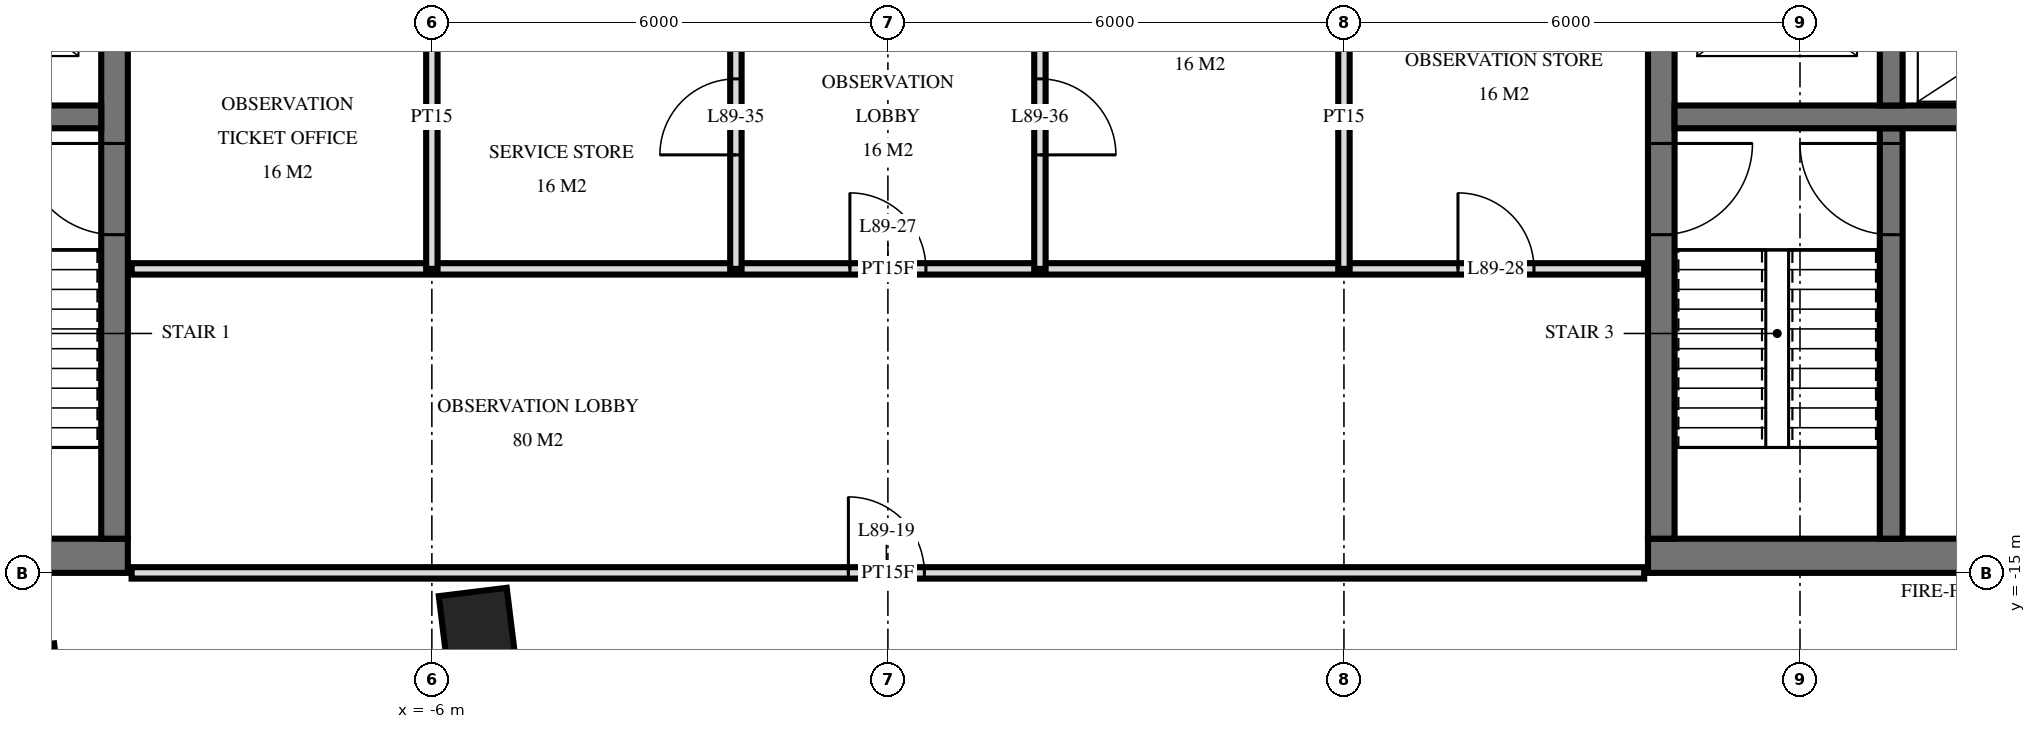
"""IFC4 building model, lengths in metres.
Left out: names, types, materials, properties, quantities, classifications, styles, units other than length and angle.
Written with IfcOpenShell. Run it as: python <this file> out.ifc"""

import sys

from ifc_helpers import new_model, si_unit, direction, frame, frame_2d, origin, origin_2d, place, context, subcontext, project, spatial, rectangle, extrude, element, fill, save


model = new_model("IFC4")
c1 = context("Model", 3, precision=1e-05, world=origin(), true_north=direction((0.0, 1.0)))
c2 = subcontext(c1, "Body", "Model", "MODEL_VIEW")
j1 = project(units=[si_unit("LENGTHUNIT", "METRE"), si_unit("PLANEANGLEUNIT", "RADIAN")], contexts=[c1])
p1 = place(None, origin())
s1 = spatial("IfcSite", under=j1, at=p1, CompositionType="ELEMENT")
p2 = place(p1, origin())
s2 = spatial("IfcBuilding", under=s1, at=p2, CompositionType="ELEMENT")
p3 = place(p2, frame((0.0, 0.0, 338.6)))
s3 = spatial("IfcBuildingStorey", under=s2, at=p3, CompositionType="ELEMENT", Elevation=338.6)
for number, where, z_axis, x_axis in (
    (1, (-11.362, -16.429, 0.0), (0.0, 0.0, 1.0), (0.993, 0.122, 0.0)),
    (2, (-5.407, -15.698, 0.0), (0.0, 0.0, 1.0), (0.993, 0.122, 0.0)),
):
    element("IfcColumn", number, at=place(p3, frame(where, z_axis=z_axis, x_axis=x_axis)), inside=s3, PredefinedType="COLUMN", context=c2, shape_type="SweptSolid", body=[
        extrude(rectangle(XDim=0.9, YDim=0.9, at=origin_2d()), origin(), (0.0, 0.0, 1.0), 4.0),
    ])
p4 = place(p3, frame((-19.5, -14.775, 0.0), z_axis=(0.0, 0.0, 1.0), x_axis=(1.0, 0.0, 0.0)))
e3 = element("IfcWall", 3, at=p4, inside=s3, PredefinedType="SHEAR", context=c2, shape_type="SweptSolid", body=[
    extrude(rectangle(XDim=9.5, YDim=0.45, at=frame_2d((4.75, 0.0))), origin(), (0.0, 0.0, 1.0), 4.0),
])
p5 = place(p4, frame((1.2, 0.0, 0.0)))
e4 = element("IfcOpeningElement", 4, at=p5, cuts=e3, PredefinedType="OPENING", context=c2, shape_type="SweptSolid", body=[
    extrude(rectangle(XDim=1.2, YDim=2.1, at=frame_2d((0.6, 1.05))), frame((0.0, 0.235, 0.0), z_axis=(0.0, -1.0, 0.0), x_axis=(1.0, 0.0, 0.0)), (0.0, 0.0, 1.0), 0.47),
])
p6 = place(p4, frame((4.25, 0.0, 0.0)))
e5 = element("IfcOpeningElement", 5, at=p6, cuts=e3, PredefinedType="OPENING", context=c2, shape_type="SweptSolid", body=[
    extrude(rectangle(XDim=1.1, YDim=2.1, at=frame_2d((0.55, 1.05))), frame((0.0, 0.235, 0.0), z_axis=(0.0, -1.0, 0.0), x_axis=(1.0, 0.0, 0.0)), (0.0, 0.0, 1.0), 0.47),
])
p7 = place(p3, frame((-10.175, -14.55, 0.0), z_axis=(0.0, 0.0, 1.0), x_axis=(0.0, 1.0, 0.0)))
e6 = element("IfcWall", 6, at=p7, inside=s3, PredefinedType="SHEAR", context=c2, shape_type="SweptSolid", body=[
    extrude(rectangle(XDim=14.1, YDim=0.35, at=frame_2d((7.05, 0.0))), origin(), (0.0, 0.0, 1.0), 4.0),
])
p8 = place(p7, frame((8.4, 0.0, 0.0)))
e7 = element("IfcOpeningElement", 7, at=p8, cuts=e6, PredefinedType="OPENING", context=c2, shape_type="SweptSolid", body=[
    extrude(rectangle(XDim=1.4, YDim=2.4, at=frame_2d((0.7, 1.2))), frame((0.0, 0.185, 0.0), z_axis=(0.0, -1.0, 0.0), x_axis=(1.0, 0.0, 0.0)), (0.0, 0.0, 1.0), 0.37),
])
p9 = place(p7, frame((10.0, 0.0, 0.0)))
e8 = element("IfcOpeningElement", 8, at=p9, cuts=e6, PredefinedType="OPENING", context=c2, shape_type="SweptSolid", body=[
    extrude(rectangle(XDim=1.4, YDim=2.4, at=frame_2d((0.7, 1.2))), frame((0.0, 0.185, 0.0), z_axis=(0.0, -1.0, 0.0), x_axis=(1.0, 0.0, 0.0)), (0.0, 0.0, 1.0), 0.37),
])
p10 = place(p7, frame((4.0, 0.0, 0.0)))
e9 = element("IfcOpeningElement", 9, at=p10, cuts=e6, PredefinedType="OPENING", context=c2, shape_type="SweptSolid", body=[
    extrude(rectangle(XDim=1.2, YDim=2.1, at=frame_2d((0.6, 1.05))), frame((0.0, 0.185, 0.0), z_axis=(0.0, -1.0, 0.0), x_axis=(1.0, 0.0, 0.0)), (0.0, 0.0, 1.0), 0.37),
])
p11 = place(p3, frame((-19.05, -9.0, 0.0), z_axis=(0.0, 0.0, 1.0), x_axis=(1.0, 0.0, 0.0)))
e10 = element("IfcWall", 10, at=p11, inside=s3, PredefinedType="SHEAR", context=c2, shape_type="SweptSolid", body=[
    extrude(rectangle(XDim=8.7, YDim=0.3, at=frame_2d((4.35, 0.0))), origin(), (0.0, 0.0, 1.0), 4.0),
])
p12 = place(p11, frame((3.8, 0.0, 0.0)))
e11 = element("IfcOpeningElement", 11, at=p12, cuts=e10, PredefinedType="OPENING", context=c2, shape_type="SweptSolid", body=[
    extrude(rectangle(XDim=1.1, YDim=2.1, at=frame_2d((0.55, 1.05))), frame((0.0, 0.16, 0.0), z_axis=(0.0, -1.0, 0.0), x_axis=(1.0, 0.0, 0.0)), (0.0, 0.0, 1.0), 0.32),
])
p13 = place(p3, frame((10.0, -14.775, 0.0), z_axis=(0.0, 0.0, 1.0), x_axis=(1.0, 0.0, 0.0)))
e12 = element("IfcWall", 12, at=p13, inside=s3, PredefinedType="SHEAR", context=c2, shape_type="SweptSolid", body=[
    extrude(rectangle(XDim=9.5, YDim=0.45, at=frame_2d((4.75, 0.0))), origin(), (0.0, 0.0, 1.0), 4.0),
])
p14 = place(p13, frame((7.1, 0.0, 0.0)))
e13 = element("IfcOpeningElement", 13, at=p14, cuts=e12, PredefinedType="OPENING", context=c2, shape_type="SweptSolid", body=[
    extrude(rectangle(XDim=1.2, YDim=2.1, at=frame_2d((0.6, 1.05))), frame((0.0, 0.235, 0.0), z_axis=(0.0, -1.0, 0.0), x_axis=(1.0, 0.0, 0.0)), (0.0, 0.0, 1.0), 0.47),
])
p15 = place(p13, frame((4.15, 0.0, 0.0)))
e14 = element("IfcOpeningElement", 14, at=p15, cuts=e12, PredefinedType="OPENING", context=c2, shape_type="SweptSolid", body=[
    extrude(rectangle(XDim=1.1, YDim=2.1, at=frame_2d((0.55, 1.05))), frame((0.0, 0.235, 0.0), z_axis=(0.0, -1.0, 0.0), x_axis=(1.0, 0.0, 0.0)), (0.0, 0.0, 1.0), 0.47),
])
p16 = place(p3, frame((10.175, -14.55, 0.0), z_axis=(0.0, 0.0, 1.0), x_axis=(0.0, 1.0, 0.0)))
e15 = element("IfcWall", 15, at=p16, inside=s3, PredefinedType="SHEAR", context=c2, shape_type="SweptSolid", body=[
    extrude(rectangle(XDim=14.1, YDim=0.35, at=frame_2d((7.05, 0.0))), origin(), (0.0, 0.0, 1.0), 4.0),
])
p17 = place(p16, frame((8.4, 0.0, 0.0)))
e16 = element("IfcOpeningElement", 16, at=p17, cuts=e15, PredefinedType="OPENING", context=c2, shape_type="SweptSolid", body=[
    extrude(rectangle(XDim=1.4, YDim=2.4, at=frame_2d((0.7, 1.2))), frame((0.0, 0.185, 0.0), z_axis=(0.0, -1.0, 0.0), x_axis=(1.0, 0.0, 0.0)), (0.0, 0.0, 1.0), 0.37),
])
p18 = place(p16, frame((10.0, 0.0, 0.0)))
e17 = element("IfcOpeningElement", 17, at=p18, cuts=e15, PredefinedType="OPENING", context=c2, shape_type="SweptSolid", body=[
    extrude(rectangle(XDim=1.4, YDim=2.4, at=frame_2d((0.7, 1.2))), frame((0.0, 0.185, 0.0), z_axis=(0.0, -1.0, 0.0), x_axis=(1.0, 0.0, 0.0)), (0.0, 0.0, 1.0), 0.37),
])
p19 = place(p16, frame((4.0, 0.0, 0.0)))
e18 = element("IfcOpeningElement", 18, at=p19, cuts=e15, PredefinedType="OPENING", context=c2, shape_type="SweptSolid", body=[
    extrude(rectangle(XDim=1.2, YDim=2.1, at=frame_2d((0.6, 1.05))), frame((0.0, 0.185, 0.0), z_axis=(0.0, -1.0, 0.0), x_axis=(1.0, 0.0, 0.0)), (0.0, 0.0, 1.0), 0.37),
])
p20 = place(p3, frame((10.35, -9.0, 0.0), z_axis=(0.0, 0.0, 1.0), x_axis=(1.0, 0.0, 0.0)))
e19 = element("IfcWall", 19, at=p20, inside=s3, PredefinedType="SHEAR", context=c2, shape_type="SweptSolid", body=[
    extrude(rectangle(XDim=8.7, YDim=0.3, at=frame_2d((4.35, 0.0))), origin(), (0.0, 0.0, 1.0), 4.0),
])
p21 = place(p20, frame((3.8, 0.0, 0.0)))
e20 = element("IfcOpeningElement", 20, at=p21, cuts=e19, PredefinedType="OPENING", context=c2, shape_type="SweptSolid", body=[
    extrude(rectangle(XDim=1.1, YDim=2.1, at=frame_2d((0.55, 1.05))), frame((0.0, 0.16, 0.0), z_axis=(0.0, -1.0, 0.0), x_axis=(1.0, 0.0, 0.0)), (0.0, 0.0, 1.0), 0.32),
])
p22 = place(p3, frame((13.2, -8.85, 0.0), z_axis=(0.0, 0.0, 1.0), x_axis=(0.0, 1.0, 0.0)))
e21 = element("IfcWall", 21, at=p22, inside=s3, PredefinedType="SHEAR", context=c2, shape_type="SweptSolid", body=[
    extrude(rectangle(XDim=2.3, YDim=0.3, at=frame_2d((1.15, 0.0))), origin(), (0.0, 0.0, 1.0), 4.0),
])
p23 = place(p3, frame((13.2, -14.55, 0.0), z_axis=(0.0, 0.0, 1.0), x_axis=(0.0, 1.0, 0.0)))
e22 = element("IfcWall", 22, at=p23, inside=s3, PredefinedType="SHEAR", context=c2, shape_type="SweptSolid", body=[
    extrude(rectangle(XDim=5.4, YDim=0.3, at=frame_2d((2.7, 0.0))), origin(), (0.0, 0.0, 1.0), 4.0),
])
p24 = place(p23, frame((4.0, 0.0, 0.0)))
e23 = element("IfcOpeningElement", 23, at=p24, cuts=e22, PredefinedType="OPENING", context=c2, shape_type="SweptSolid", body=[
    extrude(rectangle(XDim=1.2, YDim=2.1, at=frame_2d((0.6, 1.05))), frame((0.0, 0.16, 0.0), z_axis=(0.0, -1.0, 0.0), x_axis=(1.0, 0.0, 0.0)), (0.0, 0.0, 1.0), 0.32),
])
p25 = place(p3, frame((6.0, -11.0, 0.0), z_axis=(0.0, 0.0, 1.0), x_axis=(0.0, 1.0, 0.0)))
e24 = element("IfcWall", 24, at=p25, inside=s3, PredefinedType="PARTITIONING", context=c2, shape_type="SweptSolid", body=[
    extrude(rectangle(XDim=4.0, YDim=0.15, at=frame_2d((2.0, 0.0))), origin(), (0.0, 0.0, 1.0), 3.72),
])
p26 = place(p3, frame((2.0, -11.0, 0.0), z_axis=(0.0, 0.0, 1.0), x_axis=(0.0, 1.0, 0.0)))
e25 = element("IfcWall", 25, at=p26, inside=s3, PredefinedType="PARTITIONING", context=c2, shape_type="SweptSolid", body=[
    extrude(rectangle(XDim=4.0, YDim=0.15, at=frame_2d((2.0, 0.0))), origin(), (0.0, 0.0, 1.0), 3.72),
])
p27 = place(p26, frame((1.5, 0.0, 0.0)))
e26 = element("IfcOpeningElement", 26, at=p27, cuts=e25, PredefinedType="OPENING", context=c2, shape_type="SweptSolid", body=[
    extrude(rectangle(XDim=1.0, YDim=2.1, at=frame_2d((0.5, 1.05))), frame((0.0, 0.085, 0.0), z_axis=(0.0, -1.0, 0.0), x_axis=(1.0, 0.0, 0.0)), (0.0, 0.0, 1.0), 0.17),
])
p28 = place(p3, frame((-2.0, -11.0, 0.0), z_axis=(0.0, 0.0, 1.0), x_axis=(0.0, 1.0, 0.0)))
e27 = element("IfcWall", 27, at=p28, inside=s3, PredefinedType="PARTITIONING", context=c2, shape_type="SweptSolid", body=[
    extrude(rectangle(XDim=4.0, YDim=0.15, at=frame_2d((2.0, 0.0))), origin(), (0.0, 0.0, 1.0), 3.72),
])
p29 = place(p28, frame((1.5, 0.0, 0.0)))
e28 = element("IfcOpeningElement", 28, at=p29, cuts=e27, PredefinedType="OPENING", context=c2, shape_type="SweptSolid", body=[
    extrude(rectangle(XDim=1.0, YDim=2.1, at=frame_2d((0.5, 1.05))), frame((0.0, 0.085, 0.0), z_axis=(0.0, -1.0, 0.0), x_axis=(1.0, 0.0, 0.0)), (0.0, 0.0, 1.0), 0.17),
])
p30 = place(p3, frame((-6.0, -11.0, 0.0), z_axis=(0.0, 0.0, 1.0), x_axis=(0.0, 1.0, 0.0)))
e29 = element("IfcWall", 29, at=p30, inside=s3, PredefinedType="PARTITIONING", context=c2, shape_type="SweptSolid", body=[
    extrude(rectangle(XDim=4.0, YDim=0.15, at=frame_2d((2.0, 0.0))), origin(), (0.0, 0.0, 1.0), 3.72),
])
p31 = place(p3, frame((-9.95, -15.0, 0.0), z_axis=(0.0, 0.0, 1.0), x_axis=(1.0, 0.0, 0.0)))
e30 = element("IfcWall", 30, at=p31, inside=s3, PredefinedType="PARTITIONING", context=c2, shape_type="SweptSolid", body=[
    extrude(rectangle(XDim=19.9, YDim=0.15, at=frame_2d((9.95, 0.0))), origin(), (0.0, 0.0, 1.0), 3.084),
])
p32 = place(p31, frame((9.43, 0.0, 0.0)))
e31 = element("IfcOpeningElement", 31, at=p32, cuts=e30, PredefinedType="OPENING", context=c2, shape_type="SweptSolid", body=[
    extrude(rectangle(XDim=1.0, YDim=2.1, at=frame_2d((0.5, 1.05))), frame((0.0, 0.085, 0.0), z_axis=(0.0, -1.0, 0.0), x_axis=(1.0, 0.0, 0.0)), (0.0, 0.0, 1.0), 0.17),
])
p33 = place(p3, frame((-9.95, -11.0, 0.0), z_axis=(0.0, 0.0, 1.0), x_axis=(1.0, 0.0, 0.0)))
e32 = element("IfcWall", 32, at=p33, inside=s3, PredefinedType="PARTITIONING", context=c2, shape_type="SweptSolid", body=[
    extrude(rectangle(XDim=19.9, YDim=0.15, at=frame_2d((9.95, 0.0))), origin(), (0.0, 0.0, 1.0), 3.72),
])
p34 = place(p33, frame((9.45, 0.0, 0.0)))
e33 = element("IfcOpeningElement", 33, at=p34, cuts=e32, PredefinedType="OPENING", context=c2, shape_type="SweptSolid", body=[
    extrude(rectangle(XDim=1.0, YDim=2.1, at=frame_2d((0.5, 1.05))), frame((0.0, 0.085, 0.0), z_axis=(0.0, -1.0, 0.0), x_axis=(1.0, 0.0, 0.0)), (0.0, 0.0, 1.0), 0.17),
])
p35 = place(p33, frame((17.45, 0.0, 0.0)))
e34 = element("IfcOpeningElement", 34, at=p35, cuts=e32, PredefinedType="OPENING", context=c2, shape_type="SweptSolid", body=[
    extrude(rectangle(XDim=1.0, YDim=2.1, at=frame_2d((0.5, 1.05))), frame((0.0, 0.085, 0.0), z_axis=(0.0, -1.0, 0.0), x_axis=(1.0, 0.0, 0.0)), (0.0, 0.0, 1.0), 0.17),
])
p36 = place(p10, origin())
e35 = element("IfcDoor", 35, at=p36, inside=s3, OperationType="SINGLE_SWING_LEFT", PredefinedType="DOOR", context=c2, shape_type="SweptSolid", body=[
    extrude(rectangle(XDim=1.2, YDim=2.1, at=frame_2d((0.6, 1.05))), frame((0.0, 0.025, 0.0), z_axis=(0.0, -1.0, 0.0), x_axis=(1.0, 0.0, 0.0)), (0.0, 0.0, 1.0), 0.05),
])
fill(e9, e35)
p37 = place(p19, frame((0.6, 0.0, 0.0), z_axis=(0.0, 0.0, 1.0), x_axis=(-1.0, 0.0, 0.0)))
e36 = element("IfcDoor", 36, at=p37, inside=s3, OperationType="SINGLE_SWING_RIGHT", PredefinedType="DOOR", context=c2, shape_type="SweptSolid", body=[
    extrude(rectangle(XDim=1.2, YDim=2.1, at=frame_2d((0.0, 1.05))), frame((0.0, -0.025, 0.0), z_axis=(0.0, 1.0, 0.0), x_axis=(-1.0, 0.0, 0.0)), (0.0, 0.0, 1.0), 0.05),
])
fill(e18, e36)
p38 = place(p24, origin())
e37 = element("IfcDoor", 37, at=p38, inside=s3, OperationType="SINGLE_SWING_LEFT", PredefinedType="DOOR", context=c2, shape_type="SweptSolid", body=[
    extrude(rectangle(XDim=1.2, YDim=2.1, at=frame_2d((0.6, 1.05))), frame((0.0, 0.025, 0.0), z_axis=(0.0, -1.0, 0.0), x_axis=(1.0, 0.0, 0.0)), (0.0, 0.0, 1.0), 0.05),
])
fill(e23, e37)
p39 = place(p32, origin())
e38 = element("IfcDoor", 38, at=p39, inside=s3, OperationType="SINGLE_SWING_RIGHT", PredefinedType="DOOR", context=c2, shape_type="SweptSolid", body=[
    extrude(rectangle(XDim=1.0, YDim=2.1, at=frame_2d((0.5, 1.05))), frame((0.0, 0.025, 0.0), z_axis=(0.0, -1.0, 0.0), x_axis=(1.0, 0.0, 0.0)), (0.0, 0.0, 1.0), 0.05),
])
fill(e31, e38)
p40 = place(p34, origin())
e39 = element("IfcDoor", 39, at=p40, inside=s3, OperationType="SINGLE_SWING_RIGHT", PredefinedType="DOOR", context=c2, shape_type="SweptSolid", body=[
    extrude(rectangle(XDim=1.0, YDim=2.1, at=frame_2d((0.5, 1.05))), frame((0.0, 0.025, 0.0), z_axis=(0.0, -1.0, 0.0), x_axis=(1.0, 0.0, 0.0)), (0.0, 0.0, 1.0), 0.05),
])
fill(e33, e39)
p41 = place(p35, origin())
e40 = element("IfcDoor", 40, at=p41, inside=s3, OperationType="SINGLE_SWING_RIGHT", PredefinedType="DOOR", context=c2, shape_type="SweptSolid", body=[
    extrude(rectangle(XDim=1.0, YDim=2.1, at=frame_2d((0.5, 1.05))), frame((0.0, 0.025, 0.0), z_axis=(0.0, -1.0, 0.0), x_axis=(1.0, 0.0, 0.0)), (0.0, 0.0, 1.0), 0.05),
])
fill(e34, e40)
p42 = place(p29, origin())
e41 = element("IfcDoor", 41, at=p42, inside=s3, OperationType="SINGLE_SWING_RIGHT", PredefinedType="DOOR", context=c2, shape_type="SweptSolid", body=[
    extrude(rectangle(XDim=1.0, YDim=2.1, at=frame_2d((0.5, 1.05))), frame((0.0, 0.025, 0.0), z_axis=(0.0, -1.0, 0.0), x_axis=(1.0, 0.0, 0.0)), (0.0, 0.0, 1.0), 0.05),
])
fill(e28, e41)
p43 = place(p27, frame((0.5, 0.0, 0.0), z_axis=(0.0, 0.0, 1.0), x_axis=(-1.0, 0.0, 0.0)))
e42 = element("IfcDoor", 42, at=p43, inside=s3, OperationType="SINGLE_SWING_LEFT", PredefinedType="DOOR", context=c2, shape_type="SweptSolid", body=[
    extrude(rectangle(XDim=1.0, YDim=2.1, at=frame_2d((0.0, 1.05))), frame((0.0, -0.025, 0.0), z_axis=(0.0, 1.0, 0.0), x_axis=(-1.0, 0.0, 0.0)), (0.0, 0.0, 1.0), 0.05),
])
fill(e26, e42)
save(model, sys.argv[1])
